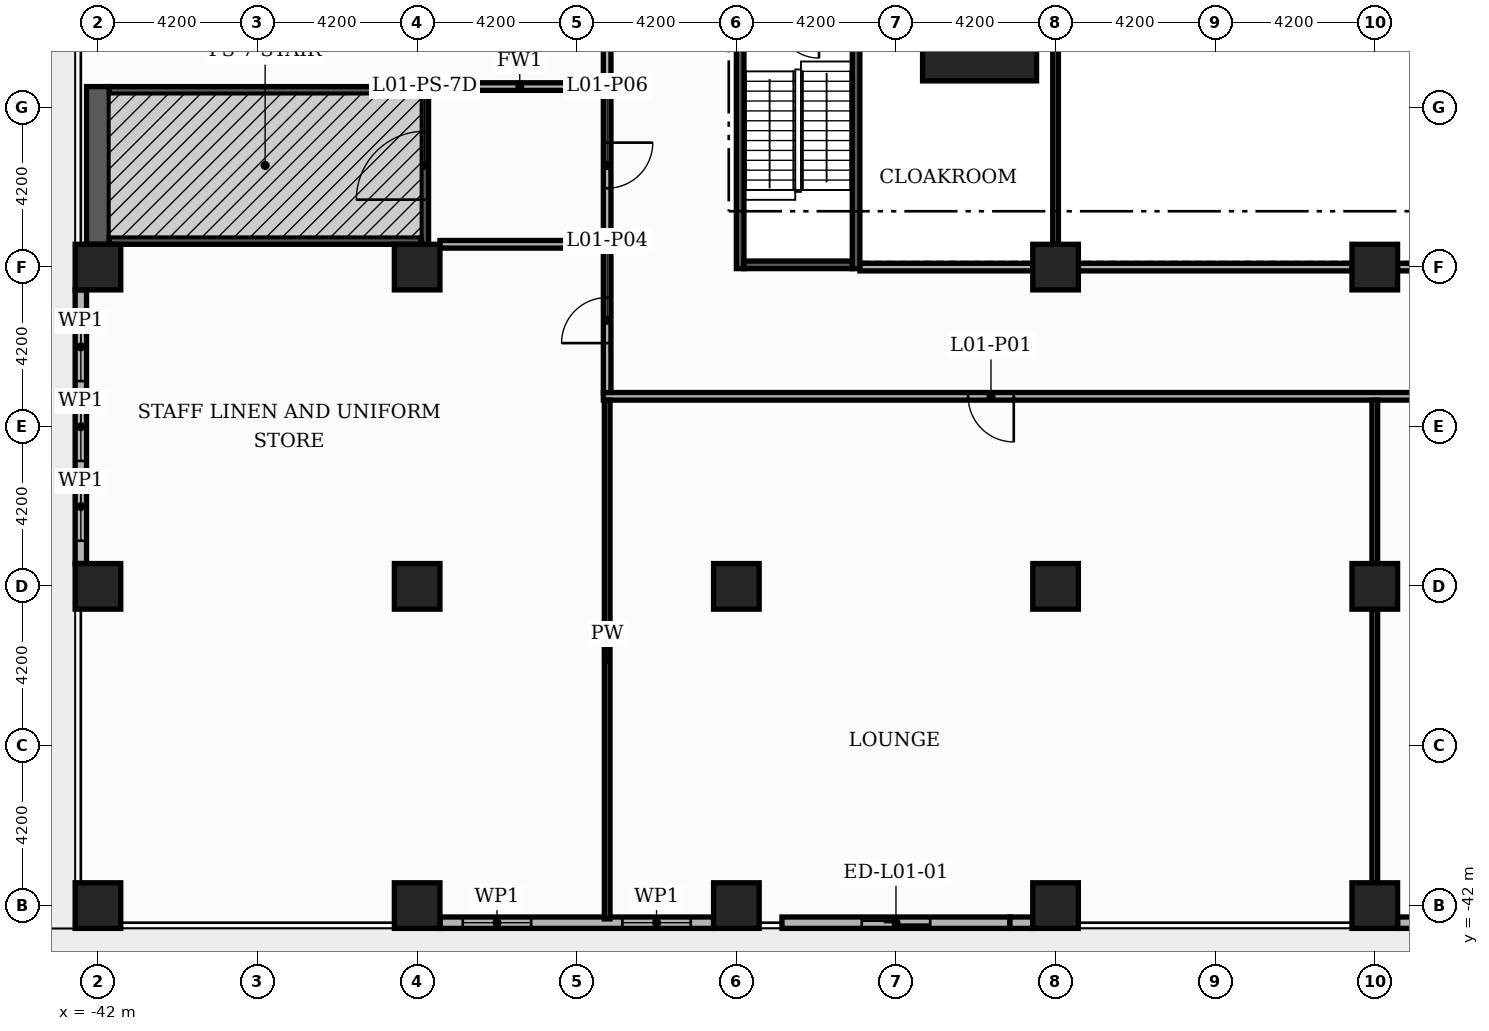
"""IFC4 building model, lengths in metres.
Left out: names, types, materials, properties, quantities, classifications, styles, units other than length and angle.
Written with IfcOpenShell. Run it as: python <this file> out.ifc"""

import sys

from ifc_helpers import new_model, si_unit, direction, frame, frame_2d, origin, origin_2d, place, context, subcontext, project, spatial, rectangle, extrude, element, fill, save


model = new_model("IFC4")
c1 = context("Model", 3, precision=1e-05, world=origin(), true_north=direction((0.0, 1.0)))
c2 = subcontext(c1, "Body", "Model", "MODEL_VIEW")
j1 = project(units=[si_unit("LENGTHUNIT", "METRE"), si_unit("PLANEANGLEUNIT", "RADIAN")], contexts=[c1])
p1 = place(None, origin())
s1 = spatial("IfcSite", under=j1, at=p1, CompositionType="ELEMENT")
p2 = place(p1, origin())
s2 = spatial("IfcBuilding", under=s1, at=p2, CompositionType="ELEMENT")
p3 = place(p2, frame((0.0, 0.0, 7.2)))
s3 = spatial("IfcBuildingStorey", under=s2, at=p3, CompositionType="ELEMENT", Elevation=7.2)
p4 = place(p3, frame((-18.8, -18.8, 0.0), z_axis=(0.0, 0.0, 1.0), x_axis=(1.0, 0.0, 0.0)))
e1 = element("IfcColumn", 1, at=p4, inside=s3, PredefinedType="COLUMN", context=c2, shape_type="SweptSolid", body=[
    extrude(rectangle(XDim=3.0, YDim=3.0, at=origin_2d()), origin(), (0.0, 0.0, 1.0), 4.8),
])
for number, where, z_axis, x_axis in (
    (2, (-8.4, -25.2, 0.0), (0.0, 0.0, 1.0), (1.0, 0.0, 0.0)),
    (3, (-16.8, -25.2, 0.0), (0.0, 0.0, 1.0), (1.0, 0.0, 0.0)),
    (4, (-8.4, -33.6, 0.0), (0.0, 0.0, 1.0), (1.0, 0.0, 0.0)),
    (5, (-8.4, -42.0, 0.0), (0.0, 0.0, 1.0), (1.0, 0.0, 0.0)),
    (6, (-16.8, -33.6, 0.0), (0.0, 0.0, 1.0), (1.0, 0.0, 0.0)),
    (7, (-16.8, -42.0, 0.0), (0.0, 0.0, 1.0), (1.0, 0.0, 0.0)),
    (8, (-25.2, -33.6, 0.0), (0.0, 0.0, 1.0), (1.0, 0.0, 0.0)),
    (9, (-25.2, -42.0, 0.0), (0.0, 0.0, 1.0), (1.0, 0.0, 0.0)),
    (10, (-33.6, -25.2, 0.0), (0.0, 0.0, 1.0), (1.0, 0.0, 0.0)),
    (11, (-33.6, -33.6, 0.0), (0.0, 0.0, 1.0), (1.0, 0.0, 0.0)),
    (12, (-33.6, -42.0, 0.0), (0.0, 0.0, 1.0), (1.0, 0.0, 0.0)),
    (13, (-42.0, -25.2, 0.0), (0.0, 0.0, 1.0), (1.0, 0.0, 0.0)),
    (14, (-42.0, -33.6, 0.0), (0.0, 0.0, 1.0), (1.0, 0.0, 0.0)),
    (15, (-42.0, -42.0, 0.0), (0.0, 0.0, 1.0), (1.0, 0.0, 0.0)),
):
    element("IfcColumn", number, at=place(p3, frame(where, z_axis=z_axis, x_axis=x_axis)), inside=s3, PredefinedType="COLUMN", context=c2, shape_type="SweptSolid", body=[
        extrude(rectangle(XDim=1.2, YDim=1.2, at=origin_2d()), origin(), (0.0, 0.0, 1.0), 4.8),
    ])
p5 = place(p3, frame((-33.0, -42.45, 0.0), z_axis=(0.0, 0.0, 1.0), x_axis=(1.0, 0.0, 0.0)))
e16 = element("IfcWall", 16, at=p5, inside=s3, PredefinedType="STANDARD", context=c2, shape_type="SweptSolid", body=[
    extrude(rectangle(XDim=7.2, YDim=0.3, at=frame_2d((3.6, 0.0))), origin(), (0.0, 0.0, 1.0), 4.38),
])
p6 = place(p5, frame((0.6, 0.0, 0.6)))
e17 = element("IfcOpeningElement", 17, at=p6, cuts=e16, PredefinedType="OPENING", context=c2, shape_type="SweptSolid", body=[
    extrude(rectangle(XDim=1.8, YDim=3.0, at=frame_2d((0.9, 1.5))), frame((0.0, 0.16, 0.0), z_axis=(0.0, -1.0, 0.0), x_axis=(1.0, 0.0, 0.0)), (0.0, 0.0, 1.0), 0.32),
])
p7 = place(p5, frame((4.8, 0.0, 0.6)))
e18 = element("IfcOpeningElement", 18, at=p7, cuts=e16, PredefinedType="OPENING", context=c2, shape_type="SweptSolid", body=[
    extrude(rectangle(XDim=1.8, YDim=3.0, at=frame_2d((0.9, 1.5))), frame((0.0, 0.16, 0.0), z_axis=(0.0, -1.0, 0.0), x_axis=(1.0, 0.0, 0.0)), (0.0, 0.0, 1.0), 0.32),
])
p8 = place(p3, frame((-24.0, -42.45, 0.0), z_axis=(0.0, 0.0, 1.0), x_axis=(1.0, 0.0, 0.0)))
e19 = element("IfcWall", 19, at=p8, inside=s3, PredefinedType="STANDARD", context=c2, shape_type="SweptSolid", body=[
    extrude(rectangle(XDim=6.0, YDim=0.3, at=frame_2d((3.0, 0.0))), origin(), (0.0, 0.0, 1.0), 4.38),
])
p9 = place(p8, frame((2.1, 0.0, 0.0)))
e20 = element("IfcOpeningElement", 20, at=p9, cuts=e19, PredefinedType="OPENING", context=c2, shape_type="SweptSolid", body=[
    extrude(rectangle(XDim=1.8, YDim=2.4, at=frame_2d((0.9, 1.2))), frame((0.0, 0.16, 0.0), z_axis=(0.0, -1.0, 0.0), x_axis=(1.0, 0.0, 0.0)), (0.0, 0.0, 1.0), 0.32),
])
for number, where, z_axis, x_axis in (
    (21, (-18.0, -42.45, 0.0), (0.0, 0.0, 1.0), (1.0, 0.0, 0.0)),
    (22, (-7.8, -42.45, 0.0), (0.0, 0.0, 1.0), (1.0, 0.0, 0.0)),
):
    element("IfcWall", number, at=place(p3, frame(where, z_axis=z_axis, x_axis=x_axis)), inside=s3, PredefinedType="STANDARD", context=c2, shape_type="SweptSolid", body=[
        extrude(rectangle(XDim=0.6, YDim=0.3, at=frame_2d((0.3, 0.0))), origin(), (0.0, 0.0, 1.0), 4.38),
    ])
p10 = place(p3, frame((-42.45, -25.8, 0.0), z_axis=(0.0, 0.0, 1.0), x_axis=(0.0, -1.0, 0.0)))
e23 = element("IfcWall", 23, at=p10, inside=s3, PredefinedType="STANDARD", context=c2, shape_type="SweptSolid", body=[
    extrude(rectangle(XDim=7.2, YDim=0.3, at=frame_2d((3.6, 0.0))), origin(), (0.0, 0.0, 1.0), 4.38),
])
p11 = place(p10, frame((0.6, 0.0, 0.6)))
e24 = element("IfcOpeningElement", 24, at=p11, cuts=e23, PredefinedType="OPENING", context=c2, shape_type="SweptSolid", body=[
    extrude(rectangle(XDim=1.8, YDim=3.0, at=frame_2d((0.9, 1.5))), frame((0.0, 0.16, 0.0), z_axis=(0.0, -1.0, 0.0), x_axis=(1.0, 0.0, 0.0)), (0.0, 0.0, 1.0), 0.32),
])
p12 = place(p10, frame((2.7, 0.0, 0.6)))
e25 = element("IfcOpeningElement", 25, at=p12, cuts=e23, PredefinedType="OPENING", context=c2, shape_type="SweptSolid", body=[
    extrude(rectangle(XDim=1.8, YDim=3.0, at=frame_2d((0.9, 1.5))), frame((0.0, 0.16, 0.0), z_axis=(0.0, -1.0, 0.0), x_axis=(1.0, 0.0, 0.0)), (0.0, 0.0, 1.0), 0.32),
])
p13 = place(p10, frame((4.8, 0.0, 0.6)))
e26 = element("IfcOpeningElement", 26, at=p13, cuts=e23, PredefinedType="OPENING", context=c2, shape_type="SweptSolid", body=[
    extrude(rectangle(XDim=1.8, YDim=3.0, at=frame_2d((0.9, 1.5))), frame((0.0, 0.16, 0.0), z_axis=(0.0, -1.0, 0.0), x_axis=(1.0, 0.0, 0.0)), (0.0, 0.0, 1.0), 0.32),
])
p14 = place(p3, frame((-28.7, -28.6, 0.0), z_axis=(0.0, 0.0, 1.0), x_axis=(1.0, 0.0, 0.0)))
e27 = element("IfcWall", 27, at=p14, inside=s3, PredefinedType="PARTITIONING", context=c2, shape_type="SweptSolid", body=[
    extrude(rectangle(XDim=57.4, YDim=0.2, at=frame_2d((28.7, 0.0))), origin(), (0.0, 0.0, 1.0), 3.98),
])
p15 = place(p14, frame((9.6, 0.0, 0.0)))
e28 = element("IfcOpeningElement", 28, at=p15, cuts=e27, PredefinedType="OPENING", context=c2, shape_type="SweptSolid", body=[
    extrude(rectangle(XDim=1.2, YDim=2.2, at=frame_2d((0.6, 1.1))), frame((0.0, 0.11, 0.0), z_axis=(0.0, -1.0, 0.0), x_axis=(1.0, 0.0, 0.0)), (0.0, 0.0, 1.0), 0.22),
])
p16 = place(p14, frame((28.1, 0.0, 0.0)))
e29 = element("IfcOpeningElement", 29, at=p16, cuts=e27, PredefinedType="OPENING", context=c2, shape_type="SweptSolid", body=[
    extrude(rectangle(XDim=1.2, YDim=2.2, at=frame_2d((0.6, 1.1))), frame((0.0, 0.11, 0.0), z_axis=(0.0, -1.0, 0.0), x_axis=(1.0, 0.0, 0.0)), (0.0, 0.0, 1.0), 0.22),
])
p17 = place(p14, frame((46.6, 0.0, 0.0)))
e30 = element("IfcOpeningElement", 30, at=p17, cuts=e27, PredefinedType="OPENING", context=c2, shape_type="SweptSolid", body=[
    extrude(rectangle(XDim=1.2, YDim=2.2, at=frame_2d((0.6, 1.1))), frame((0.0, 0.11, 0.0), z_axis=(0.0, -1.0, 0.0), x_axis=(1.0, 0.0, 0.0)), (0.0, 0.0, 1.0), 0.22),
])
p18 = place(p3, frame((-21.95, -25.2, 0.0), z_axis=(0.0, 0.0, 1.0), x_axis=(1.0, 0.0, 0.0)))
e31 = element("IfcWall", 31, at=p18, inside=s3, PredefinedType="PARTITIONING", context=c2, shape_type="SweptSolid", body=[
    extrude(rectangle(XDim=4.55, YDim=0.2, at=frame_2d((2.275, 0.0))), origin(), (0.0, 0.0, 1.0), 4.08),
])
for number, where, z_axis, x_axis in (
    (32, (-16.2, -25.2, 0.0), (0.0, 0.0, 1.0), (1.0, 0.0, 0.0)),
    (33, (-7.8, -25.2, 0.0), (0.0, 0.0, 1.0), (1.0, 0.0, 0.0)),
):
    element("IfcWall", number, at=place(p3, frame(where, z_axis=z_axis, x_axis=x_axis)), inside=s3, PredefinedType="PARTITIONING", context=c2, shape_type="SweptSolid", body=[
        extrude(rectangle(XDim=7.2, YDim=0.2, at=frame_2d((3.6, 0.0))), origin(), (0.0, 0.0, 1.0), 4.08),
    ])
p19 = place(p3, frame((-33.0, -24.6, 0.0), z_axis=(0.0, 0.0, 1.0), x_axis=(1.0, 0.0, 0.0)))
e34 = element("IfcWall", 34, at=p19, inside=s3, PredefinedType="PARTITIONING", context=c2, shape_type="SweptSolid", body=[
    extrude(rectangle(XDim=4.5, YDim=0.2, at=frame_2d((2.25, 0.0))), origin(), (0.0, 0.0, 1.0), 4.38),
])
p20 = place(p3, frame((-33.3, -20.45, 0.0), z_axis=(0.0, 0.0, 1.0), x_axis=(1.0, 0.0, 0.0)))
e35 = element("IfcWall", 35, at=p20, inside=s3, PredefinedType="PARTITIONING", context=c2, shape_type="SweptSolid", body=[
    extrude(rectangle(XDim=4.8, YDim=0.2, at=frame_2d((2.4, 0.0))), origin(), (0.0, 0.0, 1.0), 4.38),
])
p21 = place(p3, frame((-28.6, -42.35, 0.0), z_axis=(0.0, 0.0, 1.0), x_axis=(0.0, 1.0, 0.0)))
e36 = element("IfcWall", 36, at=p21, inside=s3, PredefinedType="PARTITIONING", context=c2, shape_type="SweptSolid", body=[
    extrude(rectangle(XDim=13.65, YDim=0.15, at=frame_2d((6.825, 0.0))), origin(), (0.0, 0.0, 1.0), 4.08),
])
p22 = place(p3, frame((-28.6, -28.5, 0.0), z_axis=(0.0, 0.0, 1.0), x_axis=(0.0, 1.0, 0.0)))
e37 = element("IfcWall", 37, at=p22, inside=s3, PredefinedType="PARTITIONING", context=c2, shape_type="SweptSolid", body=[
    extrude(rectangle(XDim=3.8, YDim=0.2, at=frame_2d((1.9, 0.0))), origin(), (0.0, 0.0, 1.0), 4.08),
])
p23 = place(p22, frame((1.3, 0.0, 0.0)))
e38 = element("IfcOpeningElement", 38, at=p23, cuts=e37, PredefinedType="OPENING", context=c2, shape_type="SweptSolid", body=[
    extrude(rectangle(XDim=1.2, YDim=2.2, at=frame_2d((0.6, 1.1))), frame((0.0, 0.11, 0.0), z_axis=(0.0, -1.0, 0.0), x_axis=(1.0, 0.0, 0.0)), (0.0, 0.0, 1.0), 0.22),
])
p24 = place(p3, frame((-28.6, -24.5, 0.0), z_axis=(0.0, 0.0, 1.0), x_axis=(0.0, 1.0, 0.0)))
e39 = element("IfcWall", 39, at=p24, inside=s3, PredefinedType="PARTITIONING", context=c2, shape_type="SweptSolid", body=[
    extrude(rectangle(XDim=3.95, YDim=0.2, at=frame_2d((1.975, 0.0))), origin(), (0.0, 0.0, 1.0), 4.38),
])
p25 = place(p24, frame((1.375, 0.0, 0.0)))
e40 = element("IfcOpeningElement", 40, at=p25, cuts=e39, PredefinedType="OPENING", context=c2, shape_type="SweptSolid", body=[
    extrude(rectangle(XDim=1.2, YDim=2.2, at=frame_2d((0.6, 1.1))), frame((0.0, 0.11, 0.0), z_axis=(0.0, -1.0, 0.0), x_axis=(1.0, 0.0, 0.0)), (0.0, 0.0, 1.0), 0.22),
])
p26 = place(p3, frame((-28.6, -20.35, 0.0), z_axis=(0.0, 0.0, 1.0), x_axis=(0.0, 1.0, 0.0)))
e41 = element("IfcWall", 41, at=p26, inside=s3, PredefinedType="PARTITIONING", context=c2, shape_type="SweptSolid", body=[
    extrude(rectangle(XDim=40.7, YDim=0.2, at=frame_2d((20.35, 0.0))), origin(), (0.0, 0.0, 1.0), 4.08),
])
p27 = place(p26, frame((9.525, 0.0, 0.0)))
e42 = element("IfcOpeningElement", 42, at=p27, cuts=e41, PredefinedType="OPENING", context=c2, shape_type="SweptSolid", body=[
    extrude(rectangle(XDim=1.2, YDim=2.2, at=frame_2d((0.6, 1.1))), frame((0.0, 0.11, 0.0), z_axis=(0.0, -1.0, 0.0), x_axis=(1.0, 0.0, 0.0)), (0.0, 0.0, 1.0), 0.22),
])
p28 = place(p26, frame((29.975, 0.0, 0.0)))
e43 = element("IfcOpeningElement", 43, at=p28, cuts=e41, PredefinedType="OPENING", context=c2, shape_type="SweptSolid", body=[
    extrude(rectangle(XDim=1.2, YDim=2.2, at=frame_2d((0.6, 1.1))), frame((0.0, 0.11, 0.0), z_axis=(0.0, -1.0, 0.0), x_axis=(1.0, 0.0, 0.0)), (0.0, 0.0, 1.0), 0.22),
])
p29 = place(p3, frame((-16.8, -24.6, 0.0), z_axis=(0.0, 0.0, 1.0), x_axis=(0.0, 1.0, 0.0)))
e44 = element("IfcWall", 44, at=p29, inside=s3, PredefinedType="PARTITIONING", context=c2, shape_type="SweptSolid", body=[
    extrude(rectangle(XDim=7.5, YDim=0.15, at=frame_2d((3.75, 0.0))), origin(), (0.0, 0.0, 1.0), 4.38),
])
p30 = place(p3, frame((-8.4, -41.4, 0.0), z_axis=(0.0, 0.0, 1.0), x_axis=(0.0, 1.0, 0.0)))
e45 = element("IfcWall", 45, at=p30, inside=s3, PredefinedType="PARTITIONING", context=c2, shape_type="SweptSolid", body=[
    extrude(rectangle(XDim=7.2, YDim=0.15, at=frame_2d((3.6, 0.0))), origin(), (0.0, 0.0, 1.0), 3.98),
])
p31 = place(p3, frame((-8.4, -33.0, 0.0), z_axis=(0.0, 0.0, 1.0), x_axis=(0.0, 1.0, 0.0)))
e46 = element("IfcWall", 46, at=p31, inside=s3, PredefinedType="PARTITIONING", context=c2, shape_type="SweptSolid", body=[
    extrude(rectangle(XDim=4.3, YDim=0.15, at=frame_2d((2.15, 0.0))), origin(), (0.0, 0.0, 1.0), 3.98),
])
p32 = place(p3, frame((-25.1, -25.24, 0.0), z_axis=(0.0, 0.0, 1.0), x_axis=(0.0, 1.0, 0.0)))
e47 = element("IfcWall", 47, at=p32, inside=s3, PredefinedType="SOLIDWALL", context=c2, shape_type="SweptSolid", body=[
    extrude(rectangle(XDim=6.74, YDim=0.2, at=frame_2d((3.37, 0.0))), origin(), (0.0, 0.0, 1.0), 3.98),
])
p33 = place(p3, frame((-22.05, -25.24, 0.0), z_axis=(0.0, 0.0, 1.0), x_axis=(0.0, 1.0, 0.0)))
e48 = element("IfcWall", 48, at=p33, inside=s3, PredefinedType="SOLIDWALL", context=c2, shape_type="SweptSolid", body=[
    extrude(rectangle(XDim=6.74, YDim=0.2, at=frame_2d((3.37, 0.0))), origin(), (0.0, 0.0, 1.0), 4.38),
])
p34 = place(p3, frame((-25.0, -25.14, 0.0), z_axis=(0.0, 0.0, 1.0), x_axis=(1.0, 0.0, 0.0)))
e49 = element("IfcWall", 49, at=p34, inside=s3, PredefinedType="SOLIDWALL", context=c2, shape_type="SweptSolid", body=[
    extrude(rectangle(XDim=2.85, YDim=0.2, at=frame_2d((1.425, 0.0))), origin(), (0.0, 0.0, 1.0), 4.08),
])
p35 = place(p3, frame((-42.0, -24.6, 0.0), z_axis=(0.0, 0.0, 1.0), x_axis=(0.0, 1.0, 0.0)))
e50 = element("IfcWall", 50, at=p35, inside=s3, PredefinedType="SOLIDWALL", context=c2, shape_type="SweptSolid", body=[
    extrude(rectangle(XDim=4.15, YDim=0.6, at=frame_2d((2.075, 0.0))), origin(), (0.0, 0.0, 1.0), 3.98),
])
p36 = place(p3, frame((-33.4, -24.6, 0.0), z_axis=(0.0, 0.0, 1.0), x_axis=(0.0, 1.0, 0.0)))
e51 = element("IfcWall", 51, at=p36, inside=s3, PredefinedType="SOLIDWALL", context=c2, shape_type="SweptSolid", body=[
    extrude(rectangle(XDim=4.15, YDim=0.2, at=frame_2d((2.075, 0.0))), origin(), (0.0, 0.0, 1.0), 3.98),
])
p37 = place(p36, frame((1.175, 0.0, 0.0)))
e52 = element("IfcOpeningElement", 52, at=p37, cuts=e51, PredefinedType="OPENING", context=c2, shape_type="SweptSolid", body=[
    extrude(rectangle(XDim=1.8, YDim=2.2, at=frame_2d((0.9, 1.1))), frame((0.0, 0.11, 0.0), z_axis=(0.0, -1.0, 0.0), x_axis=(1.0, 0.0, 0.0)), (0.0, 0.0, 1.0), 0.22),
])
for number, where, z_axis, x_axis in (
    (53, (-41.7, -24.5, 0.0), (0.0, 0.0, 1.0), (1.0, 0.0, 0.0)),
    (54, (-41.7, -20.55, 0.0), (0.0, 0.0, 1.0), (1.0, 0.0, 0.0)),
):
    element("IfcWall", number, at=place(p3, frame(where, z_axis=z_axis, x_axis=x_axis)), inside=s3, PredefinedType="SOLIDWALL", context=c2, shape_type="SweptSolid", body=[
        extrude(rectangle(XDim=8.2, YDim=0.2, at=frame_2d((4.1, 0.0))), origin(), (0.0, 0.0, 1.0), 4.6),
    ])
p38 = place(p6, origin())
e55 = element("IfcWindow", 55, at=p38, inside=s3, PartitioningType="SINGLE_PANEL", PredefinedType="WINDOW", context=c2, shape_type="SweptSolid", body=[
    extrude(rectangle(XDim=1.8, YDim=3.0, at=frame_2d((0.9, 1.5))), frame((0.0, 0.03, 0.0), z_axis=(0.0, -1.0, 0.0), x_axis=(1.0, 0.0, 0.0)), (0.0, 0.0, 1.0), 0.06),
])
fill(e17, e55)
p39 = place(p7, origin())
e56 = element("IfcWindow", 56, at=p39, inside=s3, PartitioningType="SINGLE_PANEL", PredefinedType="WINDOW", context=c2, shape_type="SweptSolid", body=[
    extrude(rectangle(XDim=1.8, YDim=3.0, at=frame_2d((0.9, 1.5))), frame((0.0, 0.03, 0.0), z_axis=(0.0, -1.0, 0.0), x_axis=(1.0, 0.0, 0.0)), (0.0, 0.0, 1.0), 0.06),
])
fill(e18, e56)
p40 = place(p9, origin())
e57 = element("IfcDoor", 57, at=p40, inside=s3, OperationType="SLIDING_TO_LEFT", PredefinedType="DOOR", context=c2, shape_type="SweptSolid", body=[
    extrude(rectangle(XDim=1.8, YDim=2.4, at=frame_2d((0.9, 1.2))), frame((0.0, 0.025, 0.0), z_axis=(0.0, -1.0, 0.0), x_axis=(1.0, 0.0, 0.0)), (0.0, 0.0, 1.0), 0.05),
])
fill(e20, e57)
p41 = place(p11, origin())
e58 = element("IfcWindow", 58, at=p41, inside=s3, PartitioningType="SINGLE_PANEL", PredefinedType="WINDOW", context=c2, shape_type="SweptSolid", body=[
    extrude(rectangle(XDim=1.8, YDim=3.0, at=frame_2d((0.9, 1.5))), frame((0.0, 0.03, 0.0), z_axis=(0.0, -1.0, 0.0), x_axis=(1.0, 0.0, 0.0)), (0.0, 0.0, 1.0), 0.06),
])
fill(e24, e58)
p42 = place(p12, origin())
e59 = element("IfcWindow", 59, at=p42, inside=s3, PartitioningType="SINGLE_PANEL", PredefinedType="WINDOW", context=c2, shape_type="SweptSolid", body=[
    extrude(rectangle(XDim=1.8, YDim=3.0, at=frame_2d((0.9, 1.5))), frame((0.0, 0.03, 0.0), z_axis=(0.0, -1.0, 0.0), x_axis=(1.0, 0.0, 0.0)), (0.0, 0.0, 1.0), 0.06),
])
fill(e25, e59)
p43 = place(p13, origin())
e60 = element("IfcWindow", 60, at=p43, inside=s3, PartitioningType="SINGLE_PANEL", PredefinedType="WINDOW", context=c2, shape_type="SweptSolid", body=[
    extrude(rectangle(XDim=1.8, YDim=3.0, at=frame_2d((0.9, 1.5))), frame((0.0, 0.03, 0.0), z_axis=(0.0, -1.0, 0.0), x_axis=(1.0, 0.0, 0.0)), (0.0, 0.0, 1.0), 0.06),
])
fill(e26, e60)
p44 = place(p15, origin())
e61 = element("IfcDoor", 61, at=p44, inside=s3, OperationType="SINGLE_SWING_RIGHT", PredefinedType="DOOR", context=c2, shape_type="SweptSolid", body=[
    extrude(rectangle(XDim=1.2, YDim=2.2, at=frame_2d((0.6, 1.1))), frame((0.0, 0.025, 0.0), z_axis=(0.0, -1.0, 0.0), x_axis=(1.0, 0.0, 0.0)), (0.0, 0.0, 1.0), 0.05),
])
fill(e28, e61)
p45 = place(p23, origin())
e62 = element("IfcDoor", 62, at=p45, inside=s3, OperationType="SINGLE_SWING_LEFT", PredefinedType="DOOR", context=c2, shape_type="SweptSolid", body=[
    extrude(rectangle(XDim=1.2, YDim=2.2, at=frame_2d((0.6, 1.1))), frame((0.0, 0.025, 0.0), z_axis=(0.0, -1.0, 0.0), x_axis=(1.0, 0.0, 0.0)), (0.0, 0.0, 1.0), 0.05),
])
fill(e38, e62)
p46 = place(p25, origin())
e63 = element("IfcDoor", 63, at=p46, inside=s3, OperationType="SINGLE_SWING_RIGHT", PredefinedType="DOOR", context=c2, shape_type="SweptSolid", body=[
    extrude(rectangle(XDim=1.2, YDim=2.2, at=frame_2d((0.6, 1.1))), frame((0.0, 0.025, 0.0), z_axis=(0.0, -1.0, 0.0), x_axis=(1.0, 0.0, 0.0)), (0.0, 0.0, 1.0), 0.05),
])
fill(e40, e63)
p47 = place(p37, origin())
e64 = element("IfcDoor", 64, at=p47, inside=s3, OperationType="DOUBLE_DOOR_SINGLE_SWING", PredefinedType="DOOR", context=c2, shape_type="SweptSolid", body=[
    extrude(rectangle(XDim=1.8, YDim=2.2, at=frame_2d((0.9, 1.1))), frame((0.0, 0.025, 0.0), z_axis=(0.0, -1.0, 0.0), x_axis=(1.0, 0.0, 0.0)), (0.0, 0.0, 1.0), 0.05),
])
fill(e52, e64)
save(model, sys.argv[1])
